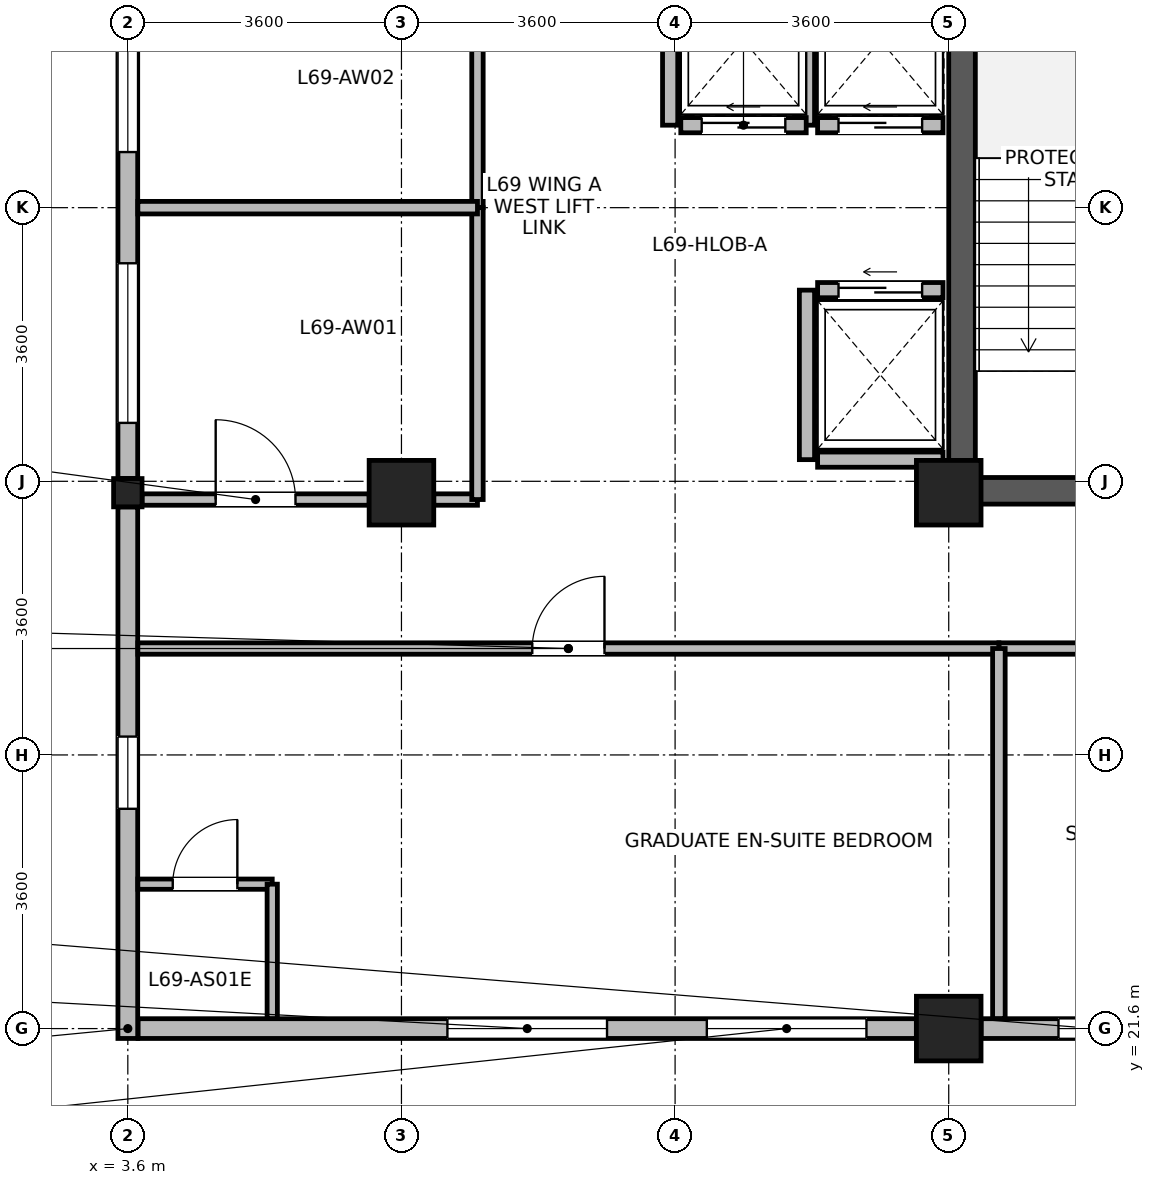
"""IFC4 building model, lengths in metres.
Left out: names, types, materials, properties, quantities, classifications, styles, units other than length and angle.
Written with IfcOpenShell. Run it as: python <this file> out.ifc"""

import sys

from ifc_helpers import new_model, si_unit, direction, frame, frame_2d, origin, origin_2d, place, context, subcontext, project, spatial, rectangle, i_section, extrude, source, transform, mapped, element, fill, save


model = new_model("IFC4")
c1 = context("Model", 3, precision=1e-05, world=origin(), true_north=direction((0.0, 1.0)))
c2 = subcontext(c1, "Body", "Model", "MODEL_VIEW")
j1 = project(units=[si_unit("LENGTHUNIT", "METRE"), si_unit("PLANEANGLEUNIT", "RADIAN")], contexts=[c1])
p1 = place(None, origin())
s1 = spatial("IfcSite", under=j1, at=p1, CompositionType="ELEMENT")
p2 = place(p1, origin())
s2 = spatial("IfcBuilding", under=s1, at=p2, CompositionType="ELEMENT")
p3 = place(p2, frame((0.0, 0.0, 268.4)))
s3 = spatial("IfcBuildingStorey", under=s2, at=p3, CompositionType="ELEMENT", Elevation=268.4)
p4 = place(p3, frame((14.575, 28.5, 0.0), z_axis=(0.0, 0.0, 1.0), x_axis=(0.0, 1.0, 0.0)))
e1 = element("IfcWall", 1, at=p4, inside=s3, PredefinedType="SHEAR", context=c2, shape_type="SweptSolid", body=[
    extrude(rectangle(XDim=7.7, YDim=0.35, at=frame_2d((3.85, 0.0))), origin(), (0.0, 0.0, 1.0), 3.475),
])
p5 = place(p3, frame((14.75, 28.675, 0.0), z_axis=(0.0, 0.0, 1.0), x_axis=(1.0, 0.0, 0.0)))
e2 = element("IfcWall", 2, at=p5, inside=s3, PredefinedType="SHEAR", context=c2, shape_type="SweptSolid", body=[
    extrude(rectangle(XDim=3.2, YDim=0.35, at=frame_2d((1.6, 0.0))), origin(), (0.0, 0.0, 1.0), 3.475),
])
m1 = source(origin(), c2, "Body", "SweptSolid", [
    extrude(rectangle(XDim=0.85, YDim=0.85, at=origin_2d()), origin(), (0.0, 0.0, 1.0), 3.7),
])
for number, where, z_axis, x_axis in (
    (3, (7.2, 28.65, 0.0), (0.0, 0.0, 1.0), (1.0, 0.0, 0.0)),
    (4, (14.4, 21.6, 0.0), (0.0, 0.0, 1.0), (1.0, 0.0, 0.0)),
    (5, (14.4, 28.65, 0.0), (0.0, 0.0, 1.0), (1.0, 0.0, 0.0)),
):
    element("IfcColumn", number, at=place(p3, frame(where, z_axis=z_axis, x_axis=x_axis)), inside=s3, PredefinedType="COLUMN", context=c2, shape_type="MappedRepresentation", body=[
        mapped(m1, transform((0.0, 0.0, 0.0), x_axis=(1.0, 0.0, 0.0), y_axis=(0.0, 1.0, 0.0), z_axis=(0.0, 0.0, 1.0), scale=1.0)),
    ])
m2 = source(origin(), c2, "Body", "SweptSolid", [
    extrude(i_section(OverallWidth=0.374, OverallDepth=0.372, WebThickness=0.015, FlangeThickness=0.026, FilletRadius=0.015, at=origin_2d()), origin(), (0.0, 0.0, 1.0), 3.7),
])
p6 = place(p3, frame((3.6, 28.65, 0.0), z_axis=(0.0, 0.0, 1.0), x_axis=(1.0, 0.0, 0.0)))
e6 = element("IfcColumn", 6, at=p6, inside=s3, PredefinedType="COLUMN", context=c2, shape_type="MappedRepresentation", body=[
    mapped(m2, transform((0.0, 0.0, 0.0), x_axis=(1.0, 0.0, 0.0), y_axis=(0.0, 1.0, 0.0), z_axis=(0.0, 0.0, 1.0), scale=1.0)),
])
p7 = place(p3, frame((13.974, 21.6, 0.0), z_axis=(0.0, 0.0, 1.0), x_axis=(-1.0, 0.0, 0.0)))
e7 = element("IfcWall", 7, at=p7, inside=s3, PredefinedType="STANDARD", context=c2, shape_type="SweptSolid", body=[
    extrude(rectangle(XDim=10.239, YDim=0.26, at=frame_2d((5.12, 0.0))), origin(), (0.0, 0.0, 1.0), 3.455),
])
p8 = place(p7, frame((0.656, 0.0, 0.85)))
e8 = element("IfcOpeningElement", 8, at=p8, cuts=e7, PredefinedType="OPENING", context=c2, shape_type="SweptSolid", body=[
    extrude(rectangle(XDim=2.1, YDim=1.95, at=frame_2d((1.05, 0.975))), frame((0.0, 0.14, 0.0), z_axis=(0.0, -1.0, 0.0), x_axis=(1.0, 0.0, 0.0)), (0.0, 0.0, 1.0), 0.28),
])
p9 = place(p7, frame((4.07, 0.0, 0.85)))
e9 = element("IfcOpeningElement", 9, at=p9, cuts=e7, PredefinedType="OPENING", context=c2, shape_type="SweptSolid", body=[
    extrude(rectangle(XDim=2.1, YDim=1.95, at=frame_2d((1.05, 0.975))), frame((0.0, 0.14, 0.0), z_axis=(0.0, -1.0, 0.0), x_axis=(1.0, 0.0, 0.0)), (0.0, 0.0, 1.0), 0.28),
])
p10 = place(p3, frame((17.812, 21.6, 0.0), z_axis=(0.0, 0.0, 1.0), x_axis=(-1.0, 0.0, 0.0)))
e10 = element("IfcWall", 10, at=p10, inside=s3, PredefinedType="STANDARD", context=c2, shape_type="SweptSolid", body=[
    extrude(rectangle(XDim=2.986, YDim=0.26, at=frame_2d((1.493, 0.0))), origin(), (0.0, 0.0, 1.0), 3.055),
])
p11 = place(p10, frame((1.018, 0.0, 0.85)))
e11 = element("IfcOpeningElement", 11, at=p11, cuts=e10, PredefinedType="OPENING", context=c2, shape_type="SweptSolid", body=[
    extrude(rectangle(XDim=0.95, YDim=1.75, at=frame_2d((0.475, 0.875))), frame((0.0, 0.14, 0.0), z_axis=(0.0, -1.0, 0.0), x_axis=(1.0, 0.0, 0.0)), (0.0, 0.0, 1.0), 0.28),
])
p12 = place(p3, frame((3.6, 28.837, 0.0), z_axis=(0.0, 0.0, 1.0), x_axis=(0.0, 1.0, 0.0)))
e12 = element("IfcWall", 12, at=p12, inside=s3, PredefinedType="STANDARD", context=c2, shape_type="SweptSolid", body=[
    extrude(rectangle(XDim=7.126, YDim=0.26, at=frame_2d((3.563, 0.0))), origin(), (0.0, 0.0, 1.0), 3.055),
])
p13 = place(p12, frame((0.731, 0.0, 0.85)))
e13 = element("IfcOpeningElement", 13, at=p13, cuts=e12, PredefinedType="OPENING", context=c2, shape_type="SweptSolid", body=[
    extrude(rectangle(XDim=2.1, YDim=1.95, at=frame_2d((1.05, 0.975))), frame((0.0, 0.14, 0.0), z_axis=(0.0, -1.0, 0.0), x_axis=(1.0, 0.0, 0.0)), (0.0, 0.0, 1.0), 0.28),
])
p14 = place(p12, frame((4.294, 0.0, 0.85)))
e14 = element("IfcOpeningElement", 14, at=p14, cuts=e12, PredefinedType="OPENING", context=c2, shape_type="SweptSolid", body=[
    extrude(rectangle(XDim=2.1, YDim=1.95, at=frame_2d((1.05, 0.975))), frame((0.0, 0.14, 0.0), z_axis=(0.0, -1.0, 0.0), x_axis=(1.0, 0.0, 0.0)), (0.0, 0.0, 1.0), 0.28),
])
p15 = place(p3, frame((3.6, 21.47, 0.0), z_axis=(0.0, 0.0, 1.0), x_axis=(0.0, 1.0, 0.0)))
e15 = element("IfcWall", 15, at=p15, inside=s3, PredefinedType="STANDARD", context=c2, shape_type="SweptSolid", body=[
    extrude(rectangle(XDim=6.993, YDim=0.26, at=frame_2d((3.497, 0.0))), origin(), (0.0, 0.0, 1.0), 3.455),
])
p16 = place(p15, frame((3.021, 0.0, 0.85)))
e16 = element("IfcOpeningElement", 16, at=p16, cuts=e15, PredefinedType="OPENING", context=c2, shape_type="SweptSolid", body=[
    extrude(rectangle(XDim=0.95, YDim=1.75, at=frame_2d((0.475, 0.875))), frame((0.0, 0.14, 0.0), z_axis=(0.0, -1.0, 0.0), x_axis=(1.0, 0.0, 0.0)), (0.0, 0.0, 1.0), 0.28),
])
p17 = place(p3, frame((12.675, 33.485, 0.0), z_axis=(0.0, 0.0, 1.0), x_axis=(1.0, 0.0, 0.0)))
e17 = element("IfcWall", 17, at=p17, inside=s3, PredefinedType="PARTITIONING", context=c2, shape_type="SweptSolid", body=[
    extrude(rectangle(XDim=1.65, YDim=0.2, at=frame_2d((0.825, 0.0))), origin(), (0.0, 0.0, 1.0), 3.455),
])
p18 = place(p17, frame((0.275, 0.0, 0.0)))
e18 = element("IfcOpeningElement", 18, at=p18, cuts=e17, PredefinedType="OPENING", context=c2, shape_type="SweptSolid", body=[
    extrude(rectangle(XDim=1.1, YDim=2.12, at=frame_2d((0.55, 1.06))), frame((0.0, 0.11, 0.0), z_axis=(0.0, -1.0, 0.0), x_axis=(1.0, 0.0, 0.0)), (0.0, 0.0, 1.0), 0.22),
])
p19 = place(p3, frame((12.535, 33.485, 0.0), z_axis=(0.0, 0.0, 1.0), x_axis=(0.0, 1.0, 0.0)))
e19 = element("IfcWall", 19, at=p19, inside=s3, PredefinedType="PARTITIONING", context=c2, shape_type="SweptSolid", body=[
    extrude(rectangle(XDim=2.23, YDim=0.2, at=frame_2d((1.115, 0.0))), origin(), (0.0, 0.0, 1.0), 3.455),
])
p20 = place(p3, frame((12.675, 29.085, 0.0), z_axis=(0.0, 0.0, 1.0), x_axis=(1.0, 0.0, 0.0)))
e20 = element("IfcWall", 20, at=p20, inside=s3, PredefinedType="PARTITIONING", context=c2, shape_type="SweptSolid", body=[
    extrude(rectangle(XDim=1.65, YDim=0.2, at=frame_2d((0.825, 0.0))), origin(), (0.0, 0.0, 1.0), 3.455),
])
p21 = place(p3, frame((12.675, 31.315, 0.0), z_axis=(0.0, 0.0, 1.0), x_axis=(1.0, 0.0, 0.0)))
e21 = element("IfcWall", 21, at=p21, inside=s3, PredefinedType="PARTITIONING", context=c2, shape_type="SweptSolid", body=[
    extrude(rectangle(XDim=1.65, YDim=0.2, at=frame_2d((0.825, 0.0))), origin(), (0.0, 0.0, 1.0), 3.455),
])
p22 = place(p21, frame((0.275, 0.0, 0.0)))
e22 = element("IfcOpeningElement", 22, at=p22, cuts=e21, PredefinedType="OPENING", context=c2, shape_type="SweptSolid", body=[
    extrude(rectangle(XDim=1.1, YDim=2.12, at=frame_2d((0.55, 1.06))), frame((0.0, 0.11, 0.0), z_axis=(0.0, -1.0, 0.0), x_axis=(1.0, 0.0, 0.0)), (0.0, 0.0, 1.0), 0.22),
])
p23 = place(p3, frame((12.535, 29.085, 0.0), z_axis=(0.0, 0.0, 1.0), x_axis=(0.0, 1.0, 0.0)))
e23 = element("IfcWall", 23, at=p23, inside=s3, PredefinedType="PARTITIONING", context=c2, shape_type="SweptSolid", body=[
    extrude(rectangle(XDim=2.23, YDim=0.2, at=frame_2d((1.115, 0.0))), origin(), (0.0, 0.0, 1.0), 3.455),
])
p24 = place(p3, frame((10.875, 33.485, 0.0), z_axis=(0.0, 0.0, 1.0), x_axis=(1.0, 0.0, 0.0)))
e24 = element("IfcWall", 24, at=p24, inside=s3, PredefinedType="PARTITIONING", context=c2, shape_type="SweptSolid", body=[
    extrude(rectangle(XDim=1.65, YDim=0.2, at=frame_2d((0.825, 0.0))), origin(), (0.0, 0.0, 1.0), 3.455),
])
p25 = place(p24, frame((0.275, 0.0, 0.0)))
e25 = element("IfcOpeningElement", 25, at=p25, cuts=e24, PredefinedType="OPENING", context=c2, shape_type="SweptSolid", body=[
    extrude(rectangle(XDim=1.1, YDim=2.12, at=frame_2d((0.55, 1.06))), frame((0.0, 0.11, 0.0), z_axis=(0.0, -1.0, 0.0), x_axis=(1.0, 0.0, 0.0)), (0.0, 0.0, 1.0), 0.22),
])
p26 = place(p3, frame((10.735, 33.485, 0.0), z_axis=(0.0, 0.0, 1.0), x_axis=(0.0, 1.0, 0.0)))
e26 = element("IfcWall", 26, at=p26, inside=s3, PredefinedType="PARTITIONING", context=c2, shape_type="SweptSolid", body=[
    extrude(rectangle(XDim=2.23, YDim=0.2, at=frame_2d((1.115, 0.0))), origin(), (0.0, 0.0, 1.0), 3.455),
])
p27 = place(p3, frame((3.732, 23.5, 0.0), z_axis=(0.0, 0.0, 1.0), x_axis=(1.0, 0.0, 0.0)))
e27 = element("IfcWall", 27, at=p27, inside=s3, PredefinedType="PARTITIONING", context=c2, shape_type="SweptSolid", body=[
    extrude(rectangle(XDim=1.768, YDim=0.135, at=frame_2d((0.884, 0.0))), origin(), (0.0, 0.0, 1.0), 3.455),
])
p28 = place(p27, frame((0.459, 0.0, 0.0)))
e28 = element("IfcOpeningElement", 28, at=p28, cuts=e27, PredefinedType="OPENING", context=c2, shape_type="SweptSolid", body=[
    extrude(rectangle(XDim=0.85, YDim=2.04, at=frame_2d((0.425, 1.02))), frame((0.0, 0.078, 0.0), z_axis=(0.0, -1.0, 0.0), x_axis=(1.0, 0.0, 0.0)), (0.0, 0.0, 1.0), 0.155),
])
p29 = place(p3, frame((5.5, 21.732, 0.0), z_axis=(0.0, 0.0, 1.0), x_axis=(0.0, 1.0, 0.0)))
e29 = element("IfcWall", 29, at=p29, inside=s3, PredefinedType="PARTITIONING", context=c2, shape_type="SweptSolid", body=[
    extrude(rectangle(XDim=1.768, YDim=0.135, at=frame_2d((0.884, 0.0))), origin(), (0.0, 0.0, 1.0), 3.455),
])
p30 = place(p3, frame((15.06, 26.6, 0.0), z_axis=(0.0, 0.0, 1.0), x_axis=(1.0, 0.0, 0.0)))
e30 = element("IfcWall", 30, at=p30, inside=s3, PredefinedType="PARTITIONING", context=c2, shape_type="SweptSolid", body=[
    extrude(rectangle(XDim=12.1, YDim=0.15, at=frame_2d((6.05, 0.0))), origin(), (0.0, 0.0, 1.0), 3.455),
])
p31 = place(p30, frame((5.575, 0.0, 0.0)))
e31 = element("IfcOpeningElement", 31, at=p31, cuts=e30, PredefinedType="OPENING", context=c2, shape_type="SweptSolid", body=[
    extrude(rectangle(XDim=0.95, YDim=2.1, at=frame_2d((0.475, 1.05))), frame((0.0, 0.085, 0.0), z_axis=(0.0, -1.0, 0.0), x_axis=(1.0, 0.0, 0.0)), (0.0, 0.0, 1.0), 0.17),
])
p32 = place(p3, frame((3.732, 26.6, 0.0), z_axis=(0.0, 0.0, 1.0), x_axis=(1.0, 0.0, 0.0)))
e32 = element("IfcWall", 32, at=p32, inside=s3, PredefinedType="PARTITIONING", context=c2, shape_type="SweptSolid", body=[
    extrude(rectangle(XDim=11.328, YDim=0.15, at=frame_2d((5.664, 0.0))), origin(), (0.0, 0.0, 1.0), 3.455),
])
p33 = place(p32, frame((5.189, 0.0, 0.0)))
e33 = element("IfcOpeningElement", 33, at=p33, cuts=e32, PredefinedType="OPENING", context=c2, shape_type="SweptSolid", body=[
    extrude(rectangle(XDim=0.95, YDim=2.1, at=frame_2d((0.475, 1.05))), frame((0.0, 0.085, 0.0), z_axis=(0.0, -1.0, 0.0), x_axis=(1.0, 0.0, 0.0)), (0.0, 0.0, 1.0), 0.17),
])
p34 = place(p3, frame((3.787, 28.56, 0.0), z_axis=(0.0, 0.0, 1.0), x_axis=(1.0, 0.0, 0.0)))
e34 = element("IfcWall", 34, at=p34, inside=s3, PredefinedType="PARTITIONING", context=c2, shape_type="SweptSolid", body=[
    extrude(rectangle(XDim=2.988, YDim=0.15, at=frame_2d((1.494, 0.0))), origin(), (0.0, 0.0, 1.0), 2.905),
])
p35 = place(p34, frame((0.969, 0.0, 0.0)))
e35 = element("IfcOpeningElement", 35, at=p35, cuts=e34, PredefinedType="OPENING", context=c2, shape_type="SweptSolid", body=[
    extrude(rectangle(XDim=1.05, YDim=2.12, at=frame_2d((0.525, 1.06))), frame((0.0, 0.085, 0.0), z_axis=(0.0, -1.0, 0.0), x_axis=(1.0, 0.0, 0.0)), (0.0, 0.0, 1.0), 0.17),
])
p36 = place(p3, frame((7.625, 28.56, 0.0), z_axis=(0.0, 0.0, 1.0), x_axis=(1.0, 0.0, 0.0)))
e36 = element("IfcWall", 36, at=p36, inside=s3, PredefinedType="PARTITIONING", context=c2, shape_type="SweptSolid", body=[
    extrude(rectangle(XDim=0.575, YDim=0.15, at=frame_2d((0.288, 0.0))), origin(), (0.0, 0.0, 1.0), 2.905),
])
p37 = place(p3, frame((8.2, 32.4, 0.0), z_axis=(0.0, 0.0, 1.0), x_axis=(0.0, 1.0, 0.0)))
e37 = element("IfcWall", 37, at=p37, inside=s3, PredefinedType="PARTITIONING", context=c2, shape_type="SweptSolid", body=[
    extrude(rectangle(XDim=3.84, YDim=0.15, at=frame_2d((1.92, 0.0))), origin(), (0.0, 0.0, 1.0), 3.455),
])
p38 = place(p3, frame((8.2, 28.56, 0.0), z_axis=(0.0, 0.0, 1.0), x_axis=(0.0, 1.0, 0.0)))
e38 = element("IfcWall", 38, at=p38, inside=s3, PredefinedType="PARTITIONING", context=c2, shape_type="SweptSolid", body=[
    extrude(rectangle(XDim=3.84, YDim=0.15, at=frame_2d((1.92, 0.0))), origin(), (0.0, 0.0, 1.0), 3.455),
])
p39 = place(p3, frame((15.06, 21.732, 0.0), z_axis=(0.0, 0.0, 1.0), x_axis=(0.0, 1.0, 0.0)))
e39 = element("IfcWall", 39, at=p39, inside=s3, PredefinedType="PARTITIONING", context=c2, shape_type="SweptSolid", body=[
    extrude(rectangle(XDim=4.868, YDim=0.165, at=frame_2d((2.434, 0.0))), origin(), (0.0, 0.0, 1.0), 3.455),
])
p40 = place(p3, frame((3.732, 32.4, 0.0), z_axis=(0.0, 0.0, 1.0), x_axis=(1.0, 0.0, 0.0)))
e40 = element("IfcWall", 40, at=p40, inside=s3, PredefinedType="PARTITIONING", context=c2, shape_type="SweptSolid", body=[
    extrude(rectangle(XDim=4.468, YDim=0.165, at=frame_2d((2.234, 0.0))), origin(), (0.0, 0.0, 1.0), 3.455),
])
p41 = place(p8, origin())
e41 = element("IfcWindow", 41, at=p41, inside=s3, PartitioningType="SINGLE_PANEL", PredefinedType="WINDOW", context=c2, shape_type="SweptSolid", body=[
    extrude(rectangle(XDim=2.1, YDim=1.95, at=frame_2d((1.05, 0.975))), frame((0.0, 0.03, 0.0), z_axis=(0.0, -1.0, 0.0), x_axis=(1.0, 0.0, 0.0)), (0.0, 0.0, 1.0), 0.06),
])
fill(e8, e41)
p42 = place(p9, origin())
e42 = element("IfcWindow", 42, at=p42, inside=s3, PartitioningType="SINGLE_PANEL", PredefinedType="WINDOW", context=c2, shape_type="SweptSolid", body=[
    extrude(rectangle(XDim=2.1, YDim=1.95, at=frame_2d((1.05, 0.975))), frame((0.0, 0.03, 0.0), z_axis=(0.0, -1.0, 0.0), x_axis=(1.0, 0.0, 0.0)), (0.0, 0.0, 1.0), 0.06),
])
fill(e9, e42)
p43 = place(p11, origin())
e43 = element("IfcWindow", 43, at=p43, inside=s3, PartitioningType="SINGLE_PANEL", PredefinedType="WINDOW", context=c2, shape_type="SweptSolid", body=[
    extrude(rectangle(XDim=0.95, YDim=1.75, at=frame_2d((0.475, 0.875))), frame((0.0, 0.03, 0.0), z_axis=(0.0, -1.0, 0.0), x_axis=(1.0, 0.0, 0.0)), (0.0, 0.0, 1.0), 0.06),
])
fill(e11, e43)
p44 = place(p13, origin())
e44 = element("IfcWindow", 44, at=p44, inside=s3, PartitioningType="SINGLE_PANEL", PredefinedType="WINDOW", context=c2, shape_type="SweptSolid", body=[
    extrude(rectangle(XDim=2.1, YDim=1.95, at=frame_2d((1.05, 0.975))), frame((0.0, 0.03, 0.0), z_axis=(0.0, -1.0, 0.0), x_axis=(1.0, 0.0, 0.0)), (0.0, 0.0, 1.0), 0.06),
])
fill(e13, e44)
p45 = place(p14, origin())
e45 = element("IfcWindow", 45, at=p45, inside=s3, PartitioningType="SINGLE_PANEL", PredefinedType="WINDOW", context=c2, shape_type="SweptSolid", body=[
    extrude(rectangle(XDim=2.1, YDim=1.95, at=frame_2d((1.05, 0.975))), frame((0.0, 0.03, 0.0), z_axis=(0.0, -1.0, 0.0), x_axis=(1.0, 0.0, 0.0)), (0.0, 0.0, 1.0), 0.06),
])
fill(e14, e45)
p46 = place(p16, origin())
e46 = element("IfcWindow", 46, at=p46, inside=s3, PartitioningType="SINGLE_PANEL", PredefinedType="WINDOW", context=c2, shape_type="SweptSolid", body=[
    extrude(rectangle(XDim=0.95, YDim=1.75, at=frame_2d((0.475, 0.875))), frame((0.0, 0.03, 0.0), z_axis=(0.0, -1.0, 0.0), x_axis=(1.0, 0.0, 0.0)), (0.0, 0.0, 1.0), 0.06),
])
fill(e16, e46)
p47 = place(p18, origin())
e47 = element("IfcDoor", 47, at=p47, inside=s3, OperationType="SLIDING_TO_LEFT", PredefinedType="DOOR", context=c2, shape_type="SweptSolid", body=[
    extrude(rectangle(XDim=1.1, YDim=2.12, at=frame_2d((0.55, 1.06))), frame((0.0, 0.025, 0.0), z_axis=(0.0, -1.0, 0.0), x_axis=(1.0, 0.0, 0.0)), (0.0, 0.0, 1.0), 0.05),
])
fill(e18, e47)
p48 = place(p22, origin())
e48 = element("IfcDoor", 48, at=p48, inside=s3, OperationType="SLIDING_TO_LEFT", PredefinedType="DOOR", context=c2, shape_type="SweptSolid", body=[
    extrude(rectangle(XDim=1.1, YDim=2.12, at=frame_2d((0.55, 1.06))), frame((0.0, 0.025, 0.0), z_axis=(0.0, -1.0, 0.0), x_axis=(1.0, 0.0, 0.0)), (0.0, 0.0, 1.0), 0.05),
])
fill(e22, e48)
p49 = place(p25, origin())
e49 = element("IfcDoor", 49, at=p49, inside=s3, OperationType="SLIDING_TO_LEFT", PredefinedType="DOOR", context=c2, shape_type="SweptSolid", body=[
    extrude(rectangle(XDim=1.1, YDim=2.12, at=frame_2d((0.55, 1.06))), frame((0.0, 0.025, 0.0), z_axis=(0.0, -1.0, 0.0), x_axis=(1.0, 0.0, 0.0)), (0.0, 0.0, 1.0), 0.05),
])
fill(e25, e49)
p50 = place(p28, origin())
e50 = element("IfcDoor", 50, at=p50, inside=s3, OperationType="SINGLE_SWING_RIGHT", PredefinedType="DOOR", context=c2, shape_type="SweptSolid", body=[
    extrude(rectangle(XDim=0.85, YDim=2.04, at=frame_2d((0.425, 1.02))), frame((0.0, 0.025, 0.0), z_axis=(0.0, -1.0, 0.0), x_axis=(1.0, 0.0, 0.0)), (0.0, 0.0, 1.0), 0.05),
])
fill(e28, e50)
p51 = place(p33, origin())
e51 = element("IfcDoor", 51, at=p51, inside=s3, OperationType="SINGLE_SWING_RIGHT", PredefinedType="DOOR", context=c2, shape_type="SweptSolid", body=[
    extrude(rectangle(XDim=0.95, YDim=2.1, at=frame_2d((0.475, 1.05))), frame((0.0, 0.025, 0.0), z_axis=(0.0, -1.0, 0.0), x_axis=(1.0, 0.0, 0.0)), (0.0, 0.0, 1.0), 0.05),
])
fill(e33, e51)
p52 = place(p35, origin())
e52 = element("IfcDoor", 52, at=p52, inside=s3, OperationType="SINGLE_SWING_LEFT", PredefinedType="DOOR", context=c2, shape_type="SweptSolid", body=[
    extrude(rectangle(XDim=1.05, YDim=2.12, at=frame_2d((0.525, 1.06))), frame((0.0, 0.025, 0.0), z_axis=(0.0, -1.0, 0.0), x_axis=(1.0, 0.0, 0.0)), (0.0, 0.0, 1.0), 0.05),
])
fill(e35, e52)
save(model, sys.argv[1])
